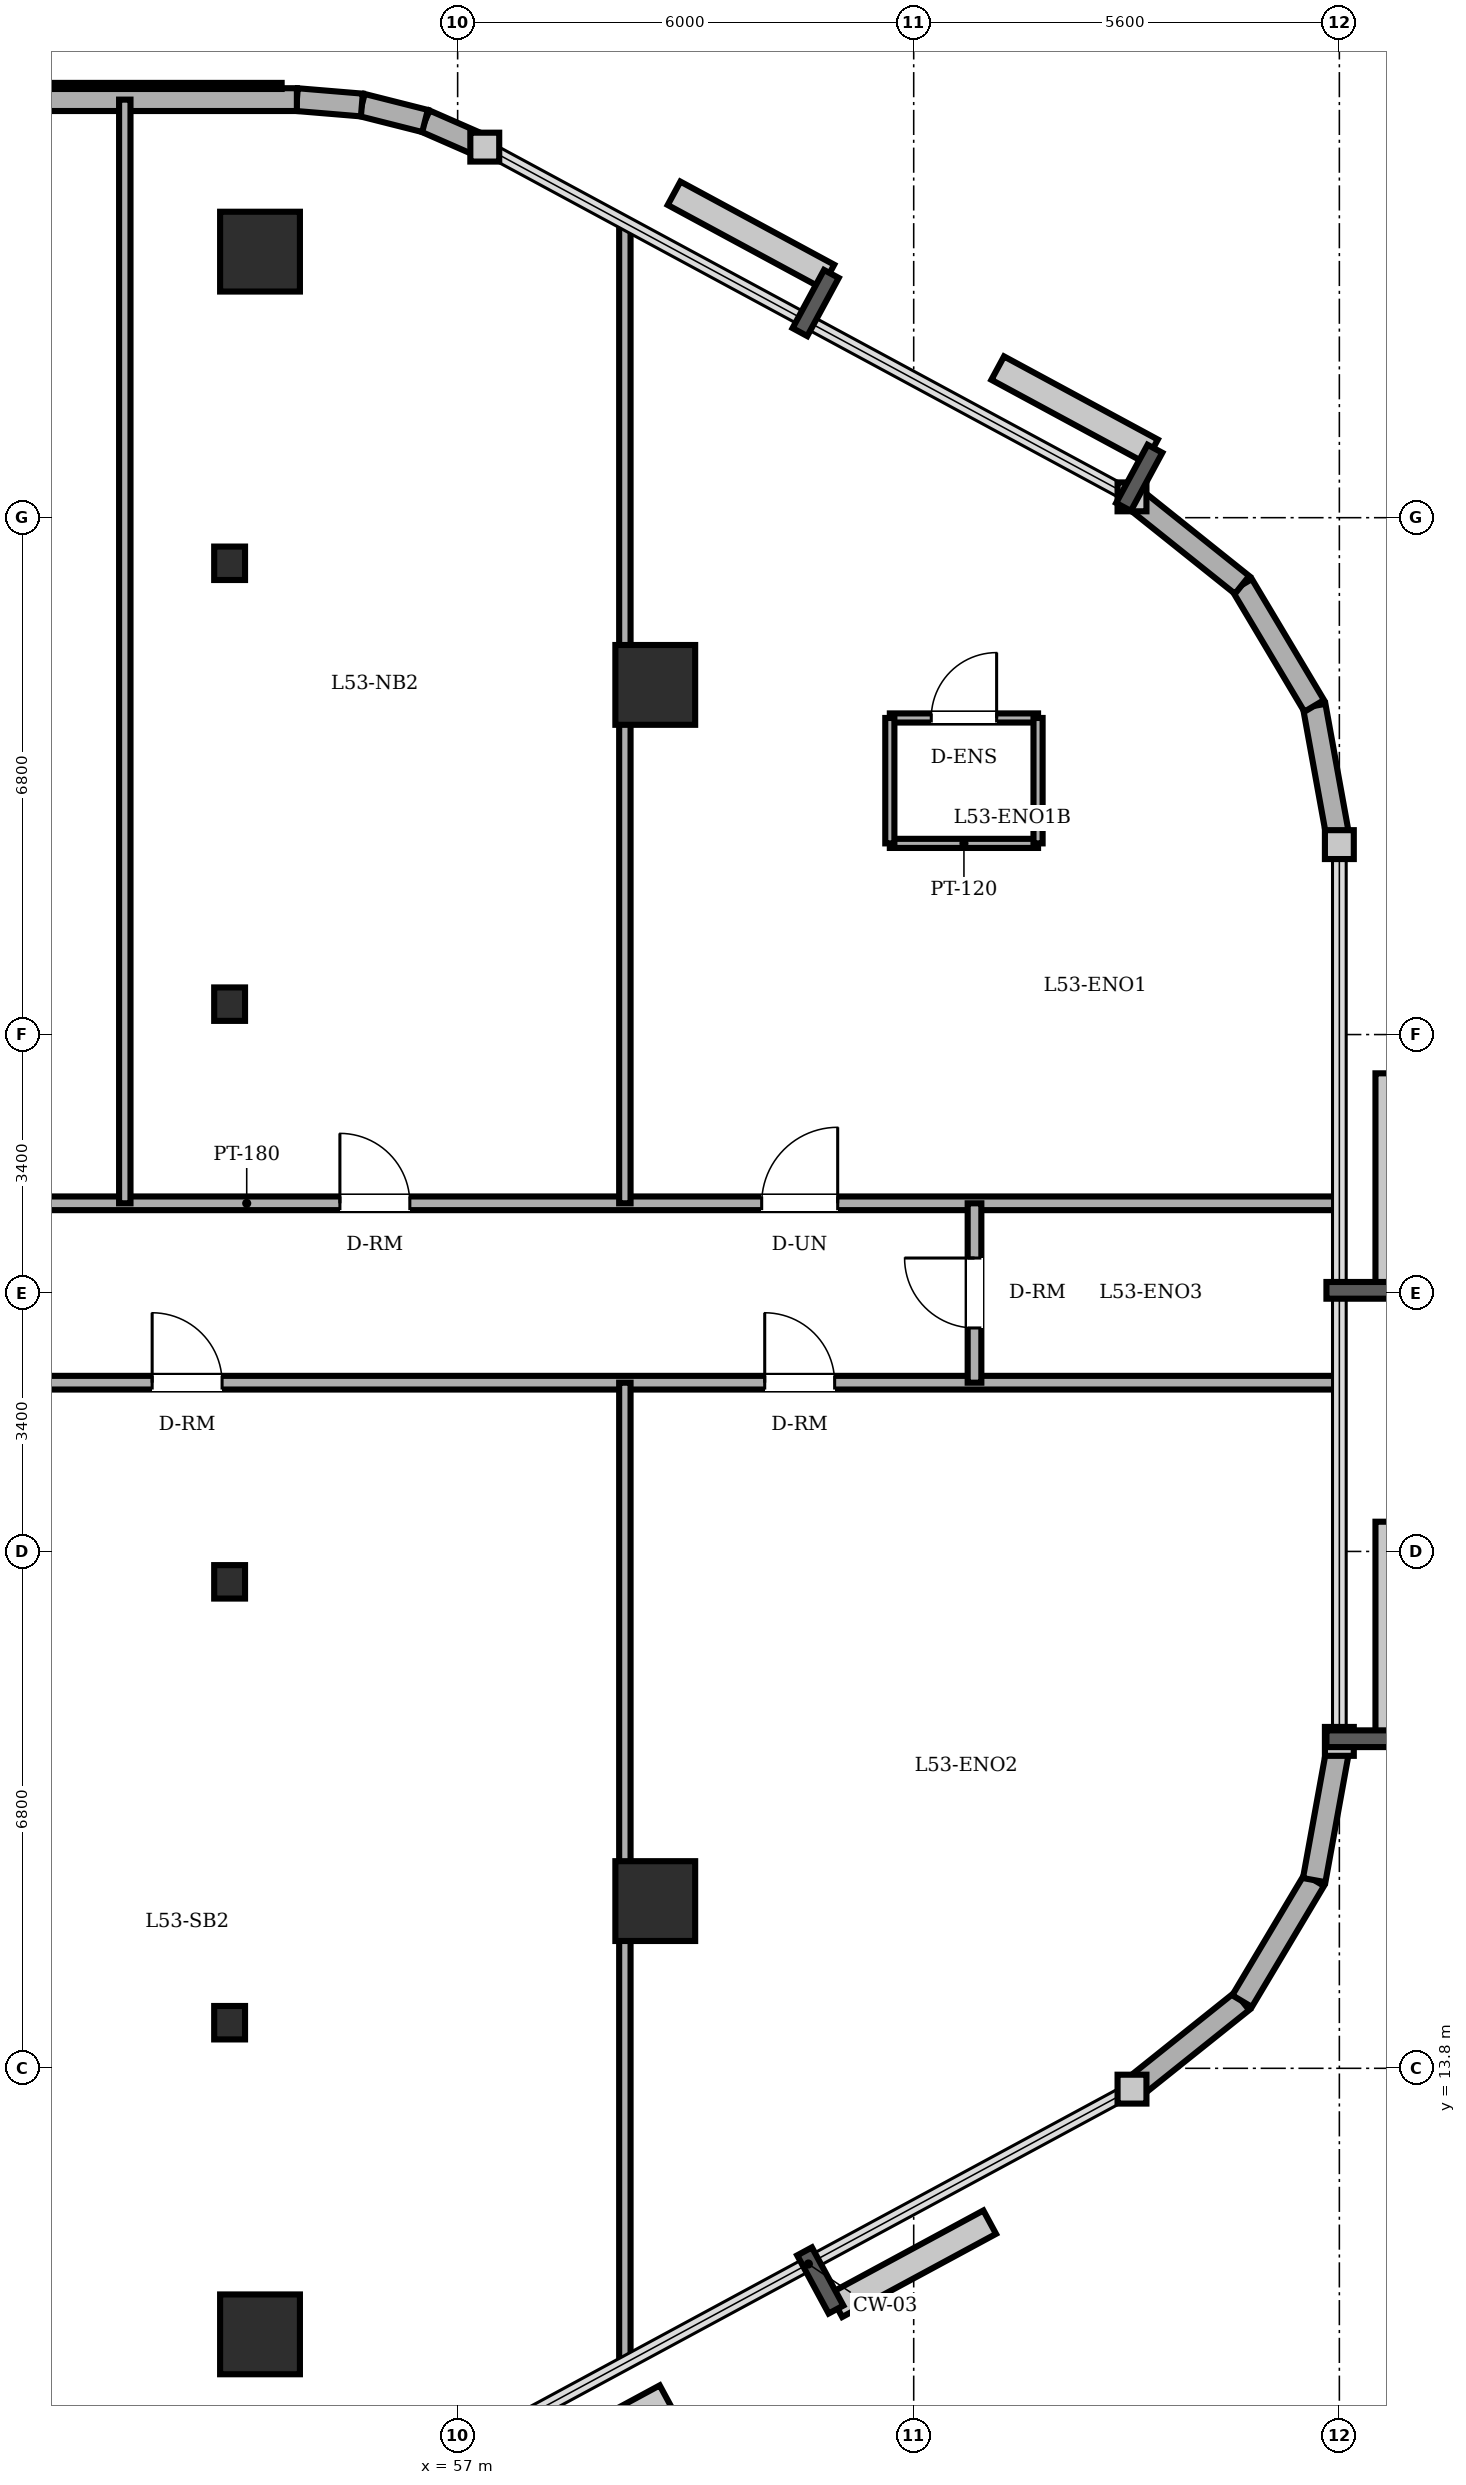
"""IFC4 building model, lengths in metres.
Left out: names, types, materials, properties, quantities, classifications, styles, units other than length and angle.
Written with IfcOpenShell. Run it as: python <this file> out.ifc"""

import sys

from ifc_helpers import new_model, si_unit, direction, frame, frame_2d, origin, origin_2d, place, context, subcontext, project, spatial, rectangle, circle, i_section, extrude, element, fill, save


model = new_model("IFC4")
c1 = context("Model", 3, precision=1e-05, world=origin(), true_north=direction((0.0, 1.0)))
c2 = subcontext(c1, "Body", "Model", "MODEL_VIEW")
j1 = project(units=[si_unit("LENGTHUNIT", "METRE"), si_unit("PLANEANGLEUNIT", "RADIAN")], contexts=[c1])
p1 = place(None, origin())
s1 = spatial("IfcSite", under=j1, at=p1, CompositionType="ELEMENT")
p2 = place(p1, origin())
s2 = spatial("IfcBuilding", under=s1, at=p2, CompositionType="ELEMENT")
p3 = place(p2, frame((0.0, 0.0, 204.9)))
s3 = spatial("IfcBuildingStorey", under=s2, at=p3, CompositionType="ELEMENT", Elevation=204.9)
for number, where, z_axis, x_axis in (
    (1, (54.4, 10.3, 0.0), (0.0, 0.0, 1.0), (1.0, 0.0, 0.0)),
    (2, (59.6, 16.0, 0.0), (0.0, 0.0, 1.0), (1.0, 0.0, 0.0)),
    (3, (59.6, 32.0, 0.0), (0.0, 0.0, 1.0), (1.0, 0.0, 0.0)),
    (4, (54.4, 37.7, 0.0), (0.0, 0.0, 1.0), (1.0, 0.0, 0.0)),
):
    element("IfcColumn", number, at=place(p3, frame(where, z_axis=z_axis, x_axis=x_axis)), inside=s3, PredefinedType="COLUMN", context=c2, shape_type="SweptSolid", body=[
        extrude(circle(Radius=0.525, at=origin_2d()), origin(), (0.0, 0.0, 1.0), 3.6),
    ])
for number, where, z_axis, x_axis in (
    (5, (54.0, 14.4, 0.0), (0.0, 0.0, 1.0), (1.0, 0.0, 0.0)),
    (6, (54.0, 20.2, 0.0), (0.0, 0.0, 1.0), (1.0, 0.0, 0.0)),
    (7, (54.0, 27.8, 0.0), (0.0, 0.0, 1.0), (1.0, 0.0, 0.0)),
    (8, (54.0, 33.6, 0.0), (0.0, 0.0, 1.0), (1.0, 0.0, 0.0)),
):
    element("IfcColumn", number, at=place(p3, frame(where, z_axis=z_axis, x_axis=x_axis)), inside=s3, PredefinedType="COLUMN", context=c2, shape_type="SweptSolid", body=[
        extrude(i_section(OverallWidth=0.406, OverallDepth=0.44, WebThickness=0.024, FlangeThickness=0.039, FilletRadius=0.015, at=origin_2d()), origin(), (0.0, 0.0, 1.0), 3.6),
    ])
p4 = place(p3, frame((65.872, 13.526, 0.0), z_axis=(0.0, 0.0, 1.0), x_axis=(0.780920189257, 0.624630817372, 0.0)))
e9 = element("IfcWall", 9, at=p4, inside=s3, PredefinedType="SOLIDWALL", context=c2, shape_type="SweptSolid", body=[
    extrude(rectangle(XDim=1.854, YDim=0.3, at=frame_2d((0.927, 0.0))), origin(), (0.0, 0.0, 1.0), 3.4),
])
p5 = place(p3, frame((67.32, 14.684, 0.0), z_axis=(0.0, 0.0, 1.0), x_axis=(0.512072018927, 0.858942516955, 0.0)))
e10 = element("IfcWall", 10, at=p5, inside=s3, PredefinedType="SOLIDWALL", context=c2, shape_type="SweptSolid", body=[
    extrude(rectangle(XDim=1.853, YDim=0.3, at=frame_2d((0.927, 0.0))), origin(), (0.0, 0.0, 1.0), 3.4),
])
for number, where, z_axis, x_axis in (
    (11, (68.269, 16.276, 0.0), (0.0, 0.0, 1.0), (0.178, 0.984, 0.0)),
    (12, (68.6, 29.899, 0.0), (0.0, 0.0, 1.0), (-0.178, 0.984, 0.0)),
):
    element("IfcWall", number, at=place(p3, frame(where, z_axis=z_axis, x_axis=x_axis)), inside=s3, PredefinedType="SOLIDWALL", context=c2, shape_type="SweptSolid", body=[
        extrude(rectangle(XDim=1.855, YDim=0.3, at=frame_2d((0.927, 0.0))), origin(), (0.0, 0.0, 1.0), 3.4),
    ])
p6 = place(p3, frame((68.269, 31.724, 0.0), z_axis=(0.0, 0.0, 1.0), x_axis=(-0.512072018927, 0.858942516955, 0.0)))
e13 = element("IfcWall", 13, at=p6, inside=s3, PredefinedType="SOLIDWALL", context=c2, shape_type="SweptSolid", body=[
    extrude(rectangle(XDim=1.853, YDim=0.3, at=frame_2d((0.927, 0.0))), origin(), (0.0, 0.0, 1.0), 3.4),
])
p7 = place(p3, frame((67.32, 33.316, 0.0), z_axis=(0.0, 0.0, 1.0), x_axis=(-0.780920189257, 0.624630817372, 0.0)))
e14 = element("IfcWall", 14, at=p7, inside=s3, PredefinedType="SOLIDWALL", context=c2, shape_type="SweptSolid", body=[
    extrude(rectangle(XDim=1.854, YDim=0.3, at=frame_2d((0.927, 0.0))), origin(), (0.0, 0.0, 1.0), 3.4),
])
p8 = place(p3, frame((57.357, 39.075, 0.0), z_axis=(0.0, 0.0, 1.0), x_axis=(-0.916085473636, 0.400983048261, 0.0)))
e15 = element("IfcWall", 15, at=p8, inside=s3, PredefinedType="SOLIDWALL", context=c2, shape_type="SweptSolid", body=[
    extrude(rectangle(XDim=0.858, YDim=0.3, at=frame_2d((0.429, 0.0))), origin(), (0.0, 0.0, 1.0), 3.4),
])
p9 = place(p3, frame((56.571, 39.419, 0.0), z_axis=(0.0, 0.0, 1.0), x_axis=(-0.969536346338, 0.244947490555, 0.0)))
e16 = element("IfcWall", 16, at=p9, inside=s3, PredefinedType="SOLIDWALL", context=c2, shape_type="SweptSolid", body=[
    extrude(rectangle(XDim=0.857, YDim=0.3, at=frame_2d((0.429, 0.0))), origin(), (0.0, 0.0, 1.0), 3.4),
])
p10 = place(p3, frame((55.74, 39.629, 0.0), z_axis=(0.0, 0.0, 1.0), x_axis=(-0.996565355958, 0.082809971041, 0.0)))
e17 = element("IfcWall", 17, at=p10, inside=s3, PredefinedType="SOLIDWALL", context=c2, shape_type="SweptSolid", body=[
    extrude(rectangle(XDim=0.858, YDim=0.3, at=frame_2d((0.429, 0.0))), origin(), (0.0, 0.0, 1.0), 3.4),
])
p11 = place(p3, frame((54.885, 39.7, 0.0), z_axis=(0.0, 0.0, 1.0), x_axis=(-1.0, 0.0, 0.0)))
e18 = element("IfcWall", 18, at=p11, inside=s3, PredefinedType="SOLIDWALL", context=c2, shape_type="SweptSolid", body=[
    extrude(rectangle(XDim=32.485, YDim=0.3, at=frame_2d((16.243, 0.0))), origin(), (0.0, 0.0, 1.0), 3.4),
])
p12 = place(p11, frame((26.485, 0.0, 0.0)))
e19 = element("IfcOpeningElement", 19, at=p12, cuts=e18, PredefinedType="OPENING", context=c2, shape_type="SweptSolid", body=[
    extrude(rectangle(XDim=0.95, YDim=2.2, at=frame_2d((0.475, 1.1))), frame((0.0, 0.16, 0.0), z_axis=(0.0, -1.0, 0.0), x_axis=(1.0, 0.0, 0.0)), (0.0, 0.0, 1.0), 0.32),
])
p13 = place(p11, frame((5.846, 0.0, 0.85)))
e20 = element("IfcOpeningElement", 20, at=p13, cuts=e18, PredefinedType="OPENING", context=c2, shape_type="SweptSolid", body=[
    extrude(rectangle(XDim=1.35, YDim=1.55, at=frame_2d((0.675, 0.775))), frame((0.0, 0.16, 0.0), z_axis=(0.0, -1.0, 0.0), x_axis=(1.0, 0.0, 0.0)), (0.0, 0.0, 1.0), 0.32),
])
p14 = place(p11, frame((10.103, 0.0, 0.85)))
e21 = element("IfcOpeningElement", 21, at=p14, cuts=e18, PredefinedType="OPENING", context=c2, shape_type="SweptSolid", body=[
    extrude(rectangle(XDim=1.35, YDim=1.55, at=frame_2d((0.675, 0.775))), frame((0.0, 0.16, 0.0), z_axis=(0.0, -1.0, 0.0), x_axis=(1.0, 0.0, 0.0)), (0.0, 0.0, 1.0), 0.32),
])
p15 = place(p11, frame((16.577, 0.0, 0.85)))
e22 = element("IfcOpeningElement", 22, at=p15, cuts=e18, PredefinedType="OPENING", context=c2, shape_type="SweptSolid", body=[
    extrude(rectangle(XDim=1.35, YDim=1.55, at=frame_2d((0.675, 0.775))), frame((0.0, 0.16, 0.0), z_axis=(0.0, -1.0, 0.0), x_axis=(1.0, 0.0, 0.0)), (0.0, 0.0, 1.0), 0.32),
])
p16 = place(p11, frame((18.793, 0.0, 0.85)))
e23 = element("IfcOpeningElement", 23, at=p16, cuts=e18, PredefinedType="OPENING", context=c2, shape_type="SweptSolid", body=[
    extrude(rectangle(XDim=1.35, YDim=1.55, at=frame_2d((0.675, 0.775))), frame((0.0, 0.16, 0.0), z_axis=(0.0, -1.0, 0.0), x_axis=(1.0, 0.0, 0.0)), (0.0, 0.0, 1.0), 0.32),
])
p17 = place(p11, frame((22.91, 0.0, 0.85)))
e24 = element("IfcOpeningElement", 24, at=p17, cuts=e18, PredefinedType="OPENING", context=c2, shape_type="SweptSolid", body=[
    extrude(rectangle(XDim=1.35, YDim=1.55, at=frame_2d((0.675, 0.775))), frame((0.0, 0.16, 0.0), z_axis=(0.0, -1.0, 0.0), x_axis=(1.0, 0.0, 0.0)), (0.0, 0.0, 1.0), 0.32),
])
p18 = place(p11, frame((29.835, 0.0, 0.85)))
e25 = element("IfcOpeningElement", 25, at=p18, cuts=e18, PredefinedType="OPENING", context=c2, shape_type="SweptSolid", body=[
    extrude(rectangle(XDim=1.35, YDim=1.55, at=frame_2d((0.675, 0.775))), frame((0.0, 0.16, 0.0), z_axis=(0.0, -1.0, 0.0), x_axis=(1.0, 0.0, 0.0)), (0.0, 0.0, 1.0), 0.32),
])
p19 = place(p3, frame((62.686, 31.565, 0.0), z_axis=(0.0, 0.0, 1.0), x_axis=(1.0, 0.0, 0.0)))
e26 = element("IfcWall", 26, at=p19, inside=s3, PredefinedType="PARTITIONING", context=c2, shape_type="SweptSolid", body=[
    extrude(rectangle(XDim=1.95, YDim=0.12, at=frame_2d((0.975, 0.0))), origin(), (0.0, 0.0, 1.0), 3.4),
])
p20 = place(p19, frame((0.545, 0.0, 0.0)))
e27 = element("IfcOpeningElement", 27, at=p20, cuts=e26, PredefinedType="OPENING", context=c2, shape_type="SweptSolid", body=[
    extrude(rectangle(XDim=0.86, YDim=2.1, at=frame_2d((0.43, 1.05))), frame((0.0, 0.07, 0.0), z_axis=(0.0, -1.0, 0.0), x_axis=(1.0, 0.0, 0.0)), (0.0, 0.0, 1.0), 0.14),
])
p21 = place(p3, frame((64.636, 29.915, 0.0), z_axis=(0.0, 0.0, 1.0), x_axis=(-1.0, 0.0, 0.0)))
e28 = element("IfcWall", 28, at=p21, inside=s3, PredefinedType="PARTITIONING", context=c2, shape_type="SweptSolid", body=[
    extrude(rectangle(XDim=1.95, YDim=0.12, at=frame_2d((0.975, 0.0))), origin(), (0.0, 0.0, 1.0), 3.4),
])
for number, where, z_axis, x_axis in (
    (29, (62.686, 31.565, 0.0), (0.0, 0.0, 1.0), (0.0, -1.0, 0.0)),
    (30, (64.636, 29.915, 0.0), (0.0, 0.0, 1.0), (0.0, 1.0, 0.0)),
):
    element("IfcWall", number, at=place(p3, frame(where, z_axis=z_axis, x_axis=x_axis)), inside=s3, PredefinedType="PARTITIONING", context=c2, shape_type="SweptSolid", body=[
        extrude(rectangle(XDim=1.65, YDim=0.12, at=frame_2d((0.825, 0.0))), origin(), (0.0, 0.0, 1.0), 3.4),
    ])
p22 = place(p3, frame((39.85, 22.82, 0.0), z_axis=(0.0, 0.0, 1.0), x_axis=(1.0, 0.0, 0.0)))
e31 = element("IfcWall", 31, at=p22, inside=s3, PredefinedType="PARTITIONING", context=c2, shape_type="SweptSolid", body=[
    extrude(rectangle(XDim=28.75, YDim=0.18, at=frame_2d((14.375, 0.0))), origin(), (0.0, 0.0, 1.0), 3.4),
])
p23 = place(p22, frame((13.131, 0.0, 0.0)))
e32 = element("IfcOpeningElement", 32, at=p23, cuts=e31, PredefinedType="OPENING", context=c2, shape_type="SweptSolid", body=[
    extrude(rectangle(XDim=0.92, YDim=2.1, at=frame_2d((0.46, 1.05))), frame((0.0, 0.1, 0.0), z_axis=(0.0, -1.0, 0.0), x_axis=(1.0, 0.0, 0.0)), (0.0, 0.0, 1.0), 0.2),
])
p24 = place(p22, frame((21.19, 0.0, 0.0)))
e33 = element("IfcOpeningElement", 33, at=p24, cuts=e31, PredefinedType="OPENING", context=c2, shape_type="SweptSolid", body=[
    extrude(rectangle(XDim=0.92, YDim=2.1, at=frame_2d((0.46, 1.05))), frame((0.0, 0.1, 0.0), z_axis=(0.0, -1.0, 0.0), x_axis=(1.0, 0.0, 0.0)), (0.0, 0.0, 1.0), 0.2),
])
p25 = place(p3, frame((39.85, 25.18, 0.0), z_axis=(0.0, 0.0, 1.0), x_axis=(1.0, 0.0, 0.0)))
e34 = element("IfcWall", 34, at=p25, inside=s3, PredefinedType="PARTITIONING", context=c2, shape_type="SweptSolid", body=[
    extrude(rectangle(XDim=28.75, YDim=0.18, at=frame_2d((14.375, 0.0))), origin(), (0.0, 0.0, 1.0), 3.4),
])
p26 = place(p25, frame((6.185, 0.0, 0.0)))
e35 = element("IfcOpeningElement", 35, at=p26, cuts=e34, PredefinedType="OPENING", context=c2, shape_type="SweptSolid", body=[
    extrude(rectangle(XDim=0.92, YDim=2.1, at=frame_2d((0.46, 1.05))), frame((0.0, 0.1, 0.0), z_axis=(0.0, -1.0, 0.0), x_axis=(1.0, 0.0, 0.0)), (0.0, 0.0, 1.0), 0.2),
])
p27 = place(p25, frame((15.601, 0.0, 0.0)))
e36 = element("IfcOpeningElement", 36, at=p27, cuts=e34, PredefinedType="OPENING", context=c2, shape_type="SweptSolid", body=[
    extrude(rectangle(XDim=0.92, YDim=2.1, at=frame_2d((0.46, 1.05))), frame((0.0, 0.1, 0.0), z_axis=(0.0, -1.0, 0.0), x_axis=(1.0, 0.0, 0.0)), (0.0, 0.0, 1.0), 0.2),
])
p28 = place(p25, frame((21.15, 0.0, 0.0)))
e37 = element("IfcOpeningElement", 37, at=p28, cuts=e34, PredefinedType="OPENING", context=c2, shape_type="SweptSolid", body=[
    extrude(rectangle(XDim=1.0, YDim=2.15, at=frame_2d((0.5, 1.075))), frame((0.0, 0.1, 0.0), z_axis=(0.0, -1.0, 0.0), x_axis=(1.0, 0.0, 0.0)), (0.0, 0.0, 1.0), 0.2),
])
p29 = place(p3, frame((52.621, 25.18, 0.0), z_axis=(0.0, 0.0, 1.0), x_axis=(0.0, 1.0, 0.0)))
e38 = element("IfcWall", 38, at=p29, inside=s3, PredefinedType="PARTITIONING", context=c2, shape_type="SweptSolid", body=[
    extrude(rectangle(XDim=14.52, YDim=0.15, at=frame_2d((7.26, 0.0))), origin(), (0.0, 0.0, 1.0), 3.4),
])
for number, where, z_axis, x_axis in (
    (39, (59.2, 9.921, 0.0), (0.0, 0.0, 1.0), (0.0, 1.0, 0.0)),
    (40, (59.2, 25.18, 0.0), (0.0, 0.0, 1.0), (0.0, 1.0, 0.0)),
):
    element("IfcWall", number, at=place(p3, frame(where, z_axis=z_axis, x_axis=x_axis)), inside=s3, PredefinedType="PARTITIONING", context=c2, shape_type="SweptSolid", body=[
        extrude(rectangle(XDim=12.899, YDim=0.15, at=frame_2d((6.45, 0.0))), origin(), (0.0, 0.0, 1.0), 3.4),
    ])
p30 = place(p3, frame((63.8, 22.82, 0.0), z_axis=(0.0, 0.0, 1.0), x_axis=(0.0, 1.0, 0.0)))
e41 = element("IfcWall", 41, at=p30, inside=s3, PredefinedType="PARTITIONING", context=c2, shape_type="SweptSolid", body=[
    extrude(rectangle(XDim=2.36, YDim=0.18, at=frame_2d((1.18, 0.0))), origin(), (0.0, 0.0, 1.0), 3.4),
])
p31 = place(p30, frame((0.72, 0.0, 0.0)))
e42 = element("IfcOpeningElement", 42, at=p31, cuts=e41, PredefinedType="OPENING", context=c2, shape_type="SweptSolid", body=[
    extrude(rectangle(XDim=0.92, YDim=2.1, at=frame_2d((0.46, 1.05))), frame((0.0, 0.1, 0.0), z_axis=(0.0, -1.0, 0.0), x_axis=(1.0, 0.0, 0.0)), (0.0, 0.0, 1.0), 0.2),
])
p32 = place(p20, origin())
e43 = element("IfcDoor", 43, at=p32, inside=s3, OperationType="SINGLE_SWING_RIGHT", PredefinedType="DOOR", context=c2, shape_type="SweptSolid", body=[
    extrude(rectangle(XDim=0.86, YDim=2.1, at=frame_2d((0.43, 1.05))), frame((0.0, 0.025, 0.0), z_axis=(0.0, -1.0, 0.0), x_axis=(1.0, 0.0, 0.0)), (0.0, 0.0, 1.0), 0.05),
])
fill(e27, e43)
p33 = place(p27, origin())
e44 = element("IfcDoor", 44, at=p33, inside=s3, OperationType="SINGLE_SWING_LEFT", PredefinedType="DOOR", context=c2, shape_type="SweptSolid", body=[
    extrude(rectangle(XDim=0.92, YDim=2.1, at=frame_2d((0.46, 1.05))), frame((0.0, 0.025, 0.0), z_axis=(0.0, -1.0, 0.0), x_axis=(1.0, 0.0, 0.0)), (0.0, 0.0, 1.0), 0.05),
])
fill(e36, e44)
p34 = place(p23, origin())
e45 = element("IfcDoor", 45, at=p34, inside=s3, OperationType="SINGLE_SWING_LEFT", PredefinedType="DOOR", context=c2, shape_type="SweptSolid", body=[
    extrude(rectangle(XDim=0.92, YDim=2.1, at=frame_2d((0.46, 1.05))), frame((0.0, 0.025, 0.0), z_axis=(0.0, -1.0, 0.0), x_axis=(1.0, 0.0, 0.0)), (0.0, 0.0, 1.0), 0.05),
])
fill(e32, e45)
p35 = place(p28, origin())
e46 = element("IfcDoor", 46, at=p35, inside=s3, OperationType="SINGLE_SWING_RIGHT", PredefinedType="DOOR", context=c2, shape_type="SweptSolid", body=[
    extrude(rectangle(XDim=1.0, YDim=2.15, at=frame_2d((0.5, 1.075))), frame((0.0, 0.025, 0.0), z_axis=(0.0, -1.0, 0.0), x_axis=(1.0, 0.0, 0.0)), (0.0, 0.0, 1.0), 0.05),
])
fill(e37, e46)
p36 = place(p24, origin())
e47 = element("IfcDoor", 47, at=p36, inside=s3, OperationType="SINGLE_SWING_LEFT", PredefinedType="DOOR", context=c2, shape_type="SweptSolid", body=[
    extrude(rectangle(XDim=0.92, YDim=2.1, at=frame_2d((0.46, 1.05))), frame((0.0, 0.025, 0.0), z_axis=(0.0, -1.0, 0.0), x_axis=(1.0, 0.0, 0.0)), (0.0, 0.0, 1.0), 0.05),
])
fill(e33, e47)
p37 = place(p31, origin())
e48 = element("IfcDoor", 48, at=p37, inside=s3, OperationType="SINGLE_SWING_RIGHT", PredefinedType="DOOR", context=c2, shape_type="SweptSolid", body=[
    extrude(rectangle(XDim=0.92, YDim=2.1, at=frame_2d((0.46, 1.05))), frame((0.0, 0.025, 0.0), z_axis=(0.0, -1.0, 0.0), x_axis=(1.0, 0.0, 0.0)), (0.0, 0.0, 1.0), 0.05),
])
fill(e42, e48)
save(model, sys.argv[1])
